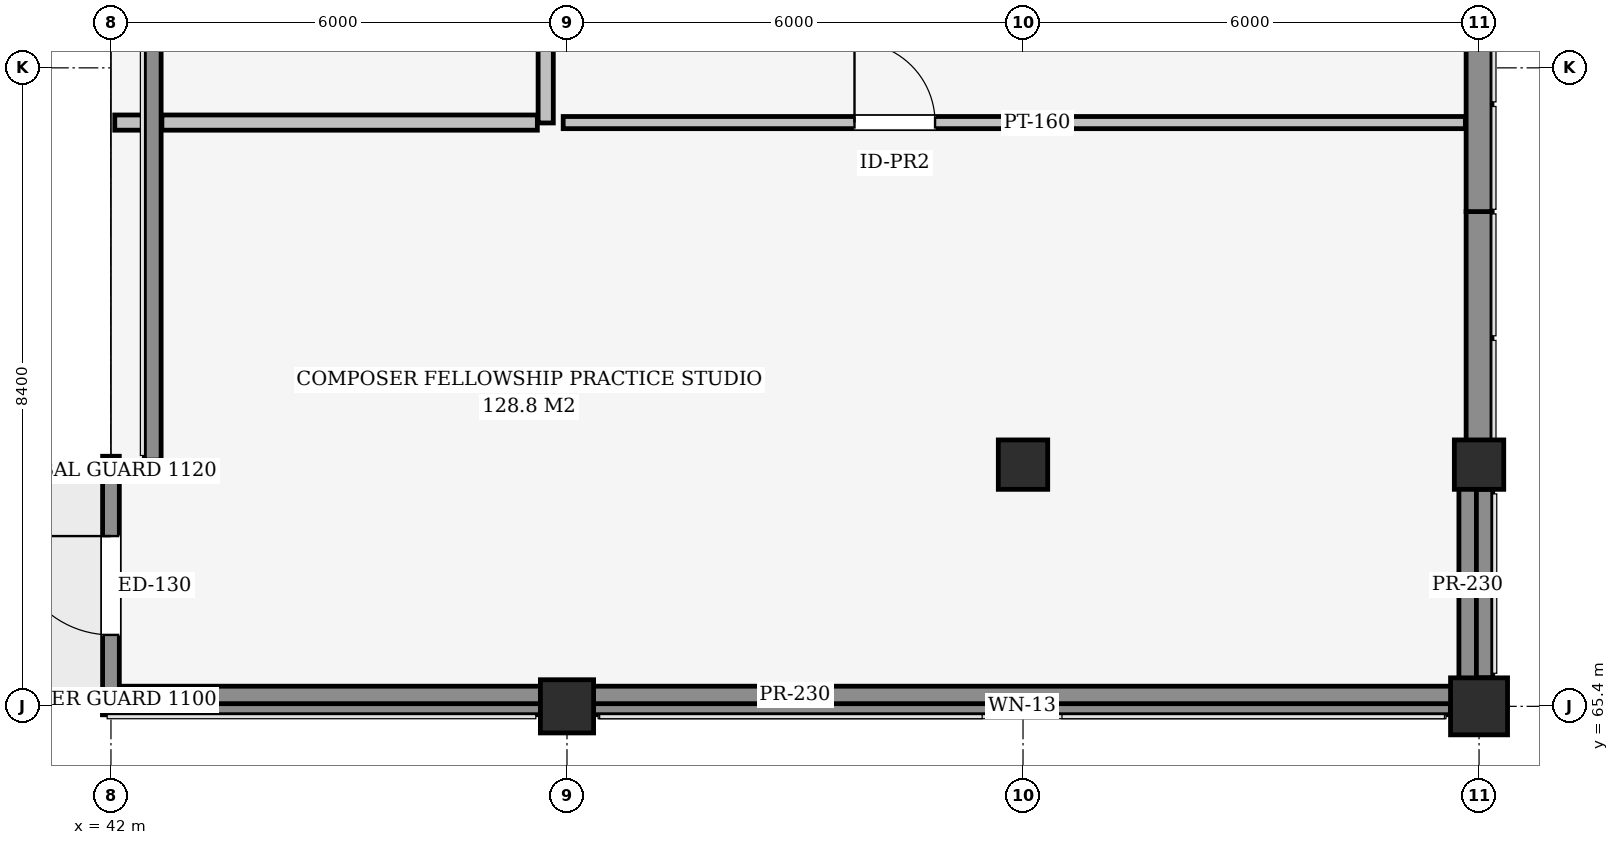
"""IFC4 building model, lengths in metres.
Left out: names, types, materials, properties, quantities, classifications, styles, units other than length and angle.
Written with IfcOpenShell. Run it as: python <this file> out.ifc"""

import sys

from ifc_helpers import new_model, si_unit, direction, frame, frame_2d, origin, origin_2d, place, context, subcontext, project, spatial, polyline, rectangle, outline, extrude, element, fill, save


model = new_model("IFC4")
c1 = context("Model", 3, precision=1e-05, world=origin(), true_north=direction((0.0, 1.0)))
c2 = subcontext(c1, "Body", "Model", "MODEL_VIEW")
j1 = project(units=[si_unit("LENGTHUNIT", "METRE"), si_unit("PLANEANGLEUNIT", "RADIAN")], contexts=[c1])
p1 = place(None, origin())
s1 = spatial("IfcSite", under=j1, at=p1, CompositionType="ELEMENT")
p2 = place(p1, origin())
s2 = spatial("IfcBuilding", under=s1, at=p2, CompositionType="ELEMENT")
p3 = place(p2, frame((0.0, 0.0, 22.2)))
s3 = spatial("IfcBuildingStorey", under=s2, at=p3, CompositionType="ELEMENT", Elevation=22.2)
p4 = place(p3, frame((48.0, 65.4, 0.0), z_axis=(0.0, 0.0, 1.0), x_axis=(1.0, 0.0, 0.0)))
e1 = element("IfcColumn", 1, at=p4, inside=s3, PredefinedType="COLUMN", context=c2, shape_type="SweptSolid", body=[
    extrude(rectangle(XDim=0.7, YDim=0.7, at=origin_2d()), origin(), (0.0, 0.0, 1.0), 4.37),
])
p5 = place(p3, frame((60.0, 65.4, 0.0), z_axis=(0.0, 0.0, 1.0), x_axis=(1.0, 0.0, 0.0)))
e2 = element("IfcColumn", 2, at=p5, inside=s3, PredefinedType="COLUMN", context=c2, shape_type="SweptSolid", body=[
    extrude(rectangle(XDim=0.75, YDim=0.75, at=origin_2d()), origin(), (0.0, 0.0, 1.0), 4.37),
])
for number, where, z_axis, x_axis in (
    (3, (54.0, 68.58, 0.0), (0.0, 0.0, 1.0), (1.0, 0.0, 0.0)),
    (4, (60.0, 68.58, 0.0), (0.0, 0.0, 1.0), (1.0, 0.0, 0.0)),
):
    element("IfcColumn", number, at=place(p3, frame(where, z_axis=z_axis, x_axis=x_axis)), inside=s3, PredefinedType="COLUMN", context=c2, shape_type="SweptSolid", body=[
        extrude(rectangle(XDim=0.65, YDim=0.65, at=origin_2d()), origin(), (0.0, 0.0, 1.0), 4.37),
    ])
p6 = place(p3, frame((47.65, 65.4, 0.0), z_axis=(0.0, 0.0, 1.0), x_axis=(-1.0, 0.0, 0.0)))
e5 = element("IfcWall", 5, at=p6, inside=s3, PredefinedType="SOLIDWALL", context=c2, shape_type="SweptSolid", body=[
    extrude(rectangle(XDim=5.76, YDim=0.22, at=frame_2d((2.88, 0.0))), origin(), (0.0, 0.0, 1.0), 4.5),
])
p7 = place(p3, frame((59.625, 65.4, 0.0), z_axis=(0.0, 0.0, 1.0), x_axis=(-1.0, 0.0, 0.0)))
e6 = element("IfcWall", 6, at=p7, inside=s3, PredefinedType="SOLIDWALL", context=c2, shape_type="SweptSolid", body=[
    extrude(rectangle(XDim=11.275, YDim=0.22, at=frame_2d((5.637, 0.0))), origin(), (0.0, 0.0, 1.0), 3.977),
])
p8 = place(p7, frame((5.212, 0.0, 0.6)))
e7 = element("IfcOpeningElement", 7, at=p8, cuts=e6, PredefinedType="OPENING", context=c2, shape_type="SweptSolid", body=[
    extrude(rectangle(XDim=0.85, YDim=2.35, at=frame_2d((0.425, 1.175))), frame((0.0, 0.12, 0.0), z_axis=(0.0, -1.0, 0.0), x_axis=(1.0, 0.0, 0.0)), (0.0, 0.0, 1.0), 0.24),
])
p9 = place(p3, frame((60.0, 68.255, 0.0), z_axis=(0.0, 0.0, 1.0), x_axis=(0.0, -1.0, 0.0)))
e8 = element("IfcWall", 8, at=p9, inside=s3, PredefinedType="SOLIDWALL", context=c2, shape_type="SweptSolid", body=[
    extrude(rectangle(XDim=2.48, YDim=0.36, at=frame_2d((1.24, 0.0))), origin(), (0.0, 0.0, 1.0), 3.738),
])
p10 = place(p3, frame((42.0, 65.29, 0.0), z_axis=(0.0, 0.0, 1.0), x_axis=(0.0, 1.0, 0.0)))
e9 = element("IfcWall", 9, at=p10, inside=s3, PredefinedType="SOLIDWALL", context=c2, shape_type="SweptSolid", body=[
    extrude(rectangle(XDim=3.4, YDim=0.22, at=frame_2d((1.7, 0.0))), origin(), (0.0, 0.0, 1.0), 3.15),
])
p11 = place(p10, frame((1.05, 0.0, 0.0)))
e10 = element("IfcOpeningElement", 10, at=p11, cuts=e9, PredefinedType="OPENING", context=c2, shape_type="SweptSolid", body=[
    extrude(rectangle(XDim=1.3, YDim=2.2, at=frame_2d((0.65, 1.1))), frame((0.0, 0.12, 0.0), z_axis=(0.0, -1.0, 0.0), x_axis=(1.0, 0.0, 0.0)), (0.0, 0.0, 1.0), 0.24),
])
p12 = place(p3, frame((42.55, 68.64, 0.0), z_axis=(0.0, 0.0, 1.0), x_axis=(0.0, 1.0, 0.0)))
e11 = element("IfcWall", 11, at=p12, inside=s3, PredefinedType="SOLIDWALL", context=c2, shape_type="SweptSolid", body=[
    extrude(rectangle(XDim=45.12, YDim=0.22, at=frame_2d((22.56, 0.0))), origin(), (0.0, 0.0, 1.0), 3.15),
])
p13 = place(p3, frame((60.0, 71.909, 0.0), z_axis=(0.0, 0.0, 1.0), x_axis=(0.0, -1.0, 0.0)))
e12 = element("IfcWall", 12, at=p13, inside=s3, PredefinedType="SOLIDWALL", context=c2, shape_type="SweptSolid", body=[
    extrude(outline(polyline([(0.0, 0.0), (3.329, 0.0), (3.329, 0.25), (0.0, 4.463), (0.0, 0.0)])), frame((0.0, 0.17, 0.0), z_axis=(0.0, -1.0, 0.0), x_axis=(1.0, 0.0, 0.0)), (0.0, 0.0, 1.0), 0.34),
])
p14 = place(p3, frame((60.0, 76.149, 0.0), z_axis=(0.0, 0.0, 1.0), x_axis=(0.0, -1.0, 0.0)))
e13 = element("IfcWall", 13, at=p14, inside=s3, PredefinedType="SOLIDWALL", context=c2, shape_type="SweptSolid", body=[
    extrude(outline(polyline([(0.0, 0.0), (4.24, 0.0), (4.24, 4.463), (0.0, 8.163), (0.0, 0.0)])), frame((0.0, 0.17, 0.0), z_axis=(0.0, -1.0, 0.0), x_axis=(1.0, 0.0, 0.0)), (0.0, 0.0, 1.0), 0.34),
])
p15 = place(p3, frame((42.15, 65.55, 4.56), z_axis=(0.0, 0.0, 1.0), x_axis=(1.0, 0.0, 0.0)))
e14 = element("IfcWall", 14, at=p15, inside=s3, PredefinedType="PARAPET", context=c2, shape_type="SweptSolid", body=[
    extrude(rectangle(XDim=17.7, YDim=0.23, at=frame_2d((8.85, 0.0))), origin(), (0.0, 0.0, 1.0), 0.94),
])
p16 = place(p3, frame((59.85, 65.55, 4.56), z_axis=(0.0, 0.0, 1.0), x_axis=(0.0, 1.0, 0.0)))
e15 = element("IfcWall", 15, at=p16, inside=s3, PredefinedType="PARAPET", context=c2, shape_type="SweptSolid", body=[
    extrude(rectangle(XDim=2.9, YDim=0.23, at=frame_2d((1.45, 0.0))), origin(), (0.0, 0.0, 1.0), 0.94),
])
p17 = place(p3, frame((47.95, 73.08, 0.0), z_axis=(0.0, 0.0, 1.0), x_axis=(1.0, 0.0, 0.0)))
e16 = element("IfcWall", 16, at=p17, inside=s3, PredefinedType="PARTITIONING", context=c2, shape_type="SweptSolid", body=[
    extrude(rectangle(XDim=11.87, YDim=0.16, at=frame_2d((5.935, 0.0))), origin(), (0.0, 0.0, 1.0), 4.5),
])
p18 = place(p17, frame((3.833, 0.0, 0.0)))
e17 = element("IfcOpeningElement", 17, at=p18, cuts=e16, PredefinedType="OPENING", context=c2, shape_type="SweptSolid", body=[
    extrude(rectangle(XDim=1.06, YDim=2.22, at=frame_2d((0.53, 1.11))), frame((0.0, 0.09, 0.0), z_axis=(0.0, -1.0, 0.0), x_axis=(1.0, 0.0, 0.0)), (0.0, 0.0, 1.0), 0.18),
])
p19 = place(p3, frame((47.72, 73.075, 0.0), z_axis=(0.0, 0.0, 1.0), x_axis=(0.0, 1.0, 0.0)))
e18 = element("IfcWall", 18, at=p19, inside=s3, PredefinedType="PARTITIONING", context=c2, shape_type="SweptSolid", body=[
    extrude(rectangle(XDim=9.392, YDim=0.2, at=frame_2d((4.696, 0.0))), origin(), (0.0, 0.0, 1.0), 4.5),
])
p20 = place(p3, frame((42.05, 73.08, 0.0), z_axis=(0.0, 0.0, 1.0), x_axis=(1.0, 0.0, 0.0)))
e19 = element("IfcWall", 19, at=p20, inside=s3, PredefinedType="PARTITIONING", context=c2, shape_type="SweptSolid", body=[
    extrude(rectangle(XDim=0.38, YDim=0.2, at=frame_2d((0.19, 0.0))), origin(), (0.0, 0.0, 1.0), 4.5),
])
p21 = place(p3, frame((42.67, 73.08, 0.0), z_axis=(0.0, 0.0, 1.0), x_axis=(1.0, 0.0, 0.0)))
e20 = element("IfcWall", 20, at=p21, inside=s3, PredefinedType="PARTITIONING", context=c2, shape_type="SweptSolid", body=[
    extrude(rectangle(XDim=4.94, YDim=0.2, at=frame_2d((2.47, 0.0))), origin(), (0.0, 0.0, 1.0), 4.5),
])
p22 = place(p8, origin())
e21 = element("IfcWindow", 21, at=p22, inside=s3, PartitioningType="SINGLE_PANEL", PredefinedType="WINDOW", context=c2, shape_type="SweptSolid", body=[
    extrude(rectangle(XDim=0.85, YDim=2.35, at=frame_2d((0.425, 1.175))), frame((0.0, 0.03, 0.0), z_axis=(0.0, -1.0, 0.0), x_axis=(1.0, 0.0, 0.0)), (0.0, 0.0, 1.0), 0.06),
])
fill(e7, e21)
p23 = place(p11, origin())
e22 = element("IfcDoor", 22, at=p23, inside=s3, OperationType="SINGLE_SWING_RIGHT", PredefinedType="DOOR", context=c2, shape_type="SweptSolid", body=[
    extrude(rectangle(XDim=1.3, YDim=2.2, at=frame_2d((0.65, 1.1))), frame((0.0, 0.025, 0.0), z_axis=(0.0, -1.0, 0.0), x_axis=(1.0, 0.0, 0.0)), (0.0, 0.0, 1.0), 0.05),
])
fill(e10, e22)
p24 = place(p18, origin())
e23 = element("IfcDoor", 23, at=p24, inside=s3, OperationType="SINGLE_SWING_LEFT", PredefinedType="DOOR", context=c2, shape_type="SweptSolid", body=[
    extrude(rectangle(XDim=1.06, YDim=2.22, at=frame_2d((0.53, 1.11))), frame((0.0, 0.025, 0.0), z_axis=(0.0, -1.0, 0.0), x_axis=(1.0, 0.0, 0.0)), (0.0, 0.0, 1.0), 0.05),
])
fill(e17, e23)
save(model, sys.argv[1])
